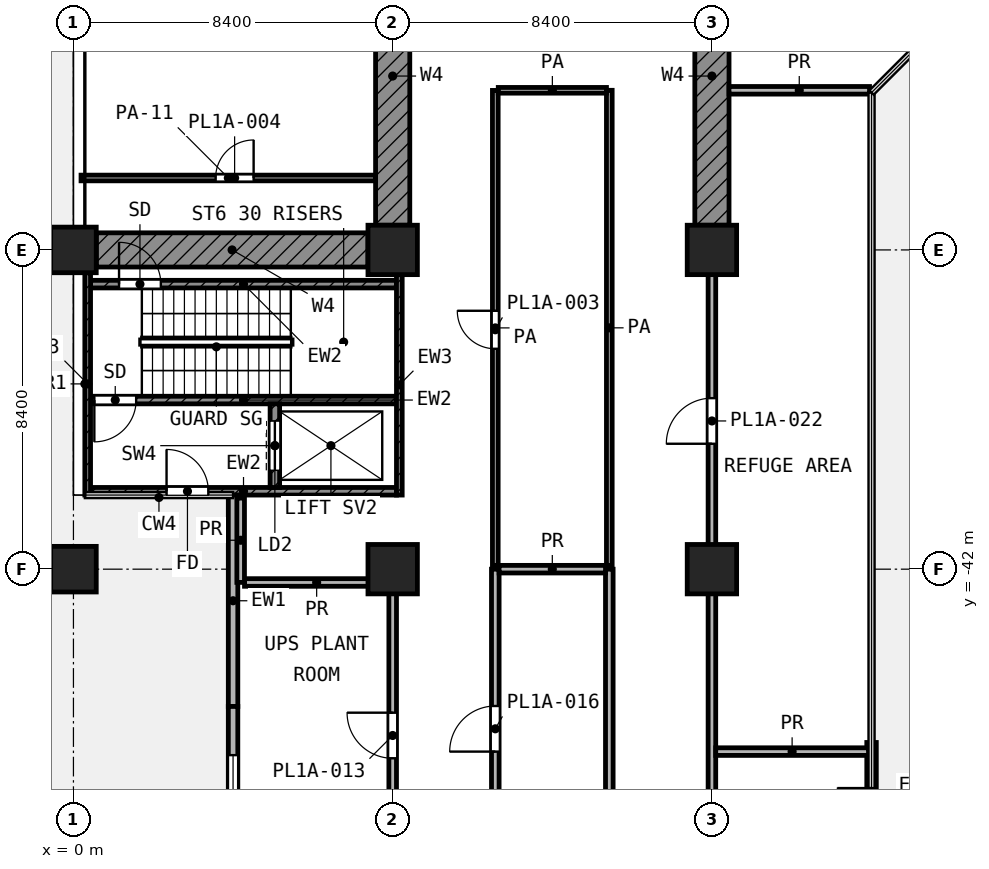
"""IFC4 building model, lengths in metres.
Left out: names, types, materials, properties, quantities, classifications, styles, units other than length and angle.
Written with IfcOpenShell. Run it as: python <this file> out.ifc"""

import sys

from ifc_helpers import new_model, si_unit, direction, frame, frame_2d, origin, origin_2d, place, context, subcontext, project, spatial, rectangle, extrude, element, fill, save


model = new_model("IFC4")
c1 = context("Model", 3, precision=1e-05, world=origin(), true_north=direction((0.0, 1.0)))
c2 = subcontext(c1, "Body", "Model", "MODEL_VIEW")
j1 = project(units=[si_unit("LENGTHUNIT", "METRE"), si_unit("PLANEANGLEUNIT", "RADIAN")], contexts=[c1])
p1 = place(None, origin())
s1 = spatial("IfcSite", under=j1, at=p1, CompositionType="ELEMENT")
p2 = place(p1, origin())
s2 = spatial("IfcBuilding", under=s1, at=p2, CompositionType="ELEMENT")
p3 = place(p2, frame((0.0, 0.0, 34.2)))
s3 = spatial("IfcBuildingStorey", under=s2, at=p3, CompositionType="ELEMENT", Elevation=34.2)
p4 = place(p3, frame((0.0, -33.6, 0.0), z_axis=(0.0, 0.0, 1.0), x_axis=(1.0, 0.0, 0.0)))
e1 = element("IfcColumn", 1, at=p4, inside=s3, PredefinedType="COLUMN", context=c2, shape_type="SweptSolid", body=[
    extrude(rectangle(XDim=1.2, YDim=1.2, at=origin_2d()), origin(), (0.0, 0.0, 1.0), 5.0),
])
for number, where, z_axis, x_axis in (
    (2, (8.4, -33.6, 0.0), (0.0, 0.0, 1.0), (1.0, 0.0, 0.0)),
    (3, (16.8, -33.6, 0.0), (0.0, 0.0, 1.0), (1.0, 0.0, 0.0)),
):
    element("IfcColumn", number, at=place(p3, frame(where, z_axis=z_axis, x_axis=x_axis)), inside=s3, PredefinedType="COLUMN", context=c2, shape_type="SweptSolid", body=[
        extrude(rectangle(XDim=1.3, YDim=1.3, at=origin_2d()), origin(), (0.0, 0.0, 1.0), 5.0),
    ])
p5 = place(p3, frame((0.0, -42.0, 0.0), z_axis=(0.0, 0.0, 1.0), x_axis=(1.0, 0.0, 0.0)))
e4 = element("IfcColumn", 4, at=p5, inside=s3, PredefinedType="COLUMN", context=c2, shape_type="SweptSolid", body=[
    extrude(rectangle(XDim=1.2, YDim=1.2, at=origin_2d()), origin(), (0.0, 0.0, 1.0), 5.0),
])
for number, where, z_axis, x_axis in (
    (5, (8.4, -42.0, 0.0), (0.0, 0.0, 1.0), (1.0, 0.0, 0.0)),
    (6, (16.8, -42.0, 0.0), (0.0, 0.0, 1.0), (1.0, 0.0, 0.0)),
):
    element("IfcColumn", number, at=place(p3, frame(where, z_axis=z_axis, x_axis=x_axis)), inside=s3, PredefinedType="COLUMN", context=c2, shape_type="SweptSolid", body=[
        extrude(rectangle(XDim=1.3, YDim=1.3, at=origin_2d()), origin(), (0.0, 0.0, 1.0), 5.0),
    ])
for number, where, z_axis, x_axis in (
    (7, (8.4, -25.1, 0.0), (0.0, 0.0, 1.0), (0.0, -1.0, 0.0)),
    (8, (16.8, -25.1, 0.0), (0.0, 0.0, 1.0), (0.0, -1.0, 0.0)),
):
    element("IfcWall", number, at=place(p3, frame(where, z_axis=z_axis, x_axis=x_axis)), inside=s3, PredefinedType="SHEAR", context=c2, shape_type="SweptSolid", body=[
        extrude(rectangle(XDim=7.85, YDim=0.9, at=frame_2d((3.925, 0.0))), origin(), (0.0, 0.0, 1.0), 4.58),
    ])
p6 = place(p3, frame((0.6, -33.6, 0.0), z_axis=(0.0, 0.0, 1.0), x_axis=(1.0, 0.0, 0.0)))
e9 = element("IfcWall", 9, at=p6, inside=s3, PredefinedType="SHEAR", context=c2, shape_type="SweptSolid", body=[
    extrude(rectangle(XDim=7.15, YDim=0.9, at=frame_2d((3.575, 0.0))), origin(), (0.0, 0.0, 1.0), 4.58),
])
p7 = place(p3, frame((4.2, -40.05, 0.0), z_axis=(0.0, 0.0, 1.0), x_axis=(0.0, -1.0, 0.0)))
e10 = element("IfcWall", 10, at=p7, inside=s3, PredefinedType="SOLIDWALL", context=c2, shape_type="SweptSolid", body=[
    extrude(rectangle(XDim=5.562, YDim=0.25, at=frame_2d((2.781, 0.0))), origin(), (0.0, 0.0, 1.0), 4.58),
])
p8 = place(p3, frame((4.2, -45.612, 0.0), z_axis=(0.0, 0.0, 1.0), x_axis=(0.0, -1.0, 0.0)))
e11 = element("IfcWall", 11, at=p8, inside=s3, PredefinedType="SOLIDWALL", context=c2, shape_type="SweptSolid", body=[
    extrude(rectangle(XDim=5.562, YDim=0.25, at=frame_2d((2.781, 0.0))), origin(), (0.0, 0.0, 1.0), 4.58),
])
p9 = place(p8, frame((1.281, 0.0, 0.6)))
e12 = element("IfcOpeningElement", 12, at=p9, cuts=e11, PredefinedType="OPENING", context=c2, shape_type="SweptSolid", body=[
    extrude(rectangle(XDim=3.0, YDim=2.4, at=frame_2d((1.5, 1.2))), frame((0.0, 0.135, 0.0), z_axis=(0.0, -1.0, 0.0), x_axis=(1.0, 0.0, 0.0)), (0.0, 0.0, 1.0), 0.27),
])
p10 = place(p3, frame((21.0, -50.76, 0.0), z_axis=(0.0, 0.0, 1.0), x_axis=(0.0, 1.0, 0.0)))
e13 = element("IfcWall", 13, at=p10, inside=s3, PredefinedType="SOLIDWALL", context=c2, shape_type="SweptSolid", body=[
    extrude(rectangle(XDim=4.2, YDim=0.25, at=frame_2d((2.1, 0.0))), origin(), (0.0, 0.0, 1.0), 4.42),
])
p11 = place(p10, frame((1.2, 0.0, 0.0)))
e14 = element("IfcOpeningElement", 14, at=p11, cuts=e13, PredefinedType="OPENING", context=c2, shape_type="SweptSolid", body=[
    extrude(rectangle(XDim=1.8, YDim=2.1, at=frame_2d((0.9, 1.05))), frame((0.0, 0.135, 0.0), z_axis=(0.0, -1.0, 0.0), x_axis=(1.0, 0.0, 0.0)), (0.0, 0.0, 1.0), 0.27),
])
p12 = place(p3, frame((0.375, -40.05, 0.0), z_axis=(0.0, 0.0, 1.0), x_axis=(0.0, 1.0, 0.0)))
e15 = element("IfcWall", 15, at=p12, inside=s3, PredefinedType="SHEAR", context=c2, shape_type="SweptSolid", body=[
    extrude(rectangle(XDim=5.85, YDim=0.15, at=frame_2d((2.925, 0.0))), origin(), (0.0, 0.0, 1.0), 4.58),
])
p13 = place(p3, frame((8.575, -40.05, 0.0), z_axis=(0.0, 0.0, 1.0), x_axis=(0.0, 1.0, 0.0)))
e16 = element("IfcWall", 16, at=p13, inside=s3, PredefinedType="SHEAR", context=c2, shape_type="SweptSolid", body=[
    extrude(rectangle(XDim=5.8, YDim=0.15, at=frame_2d((2.9, 0.0))), origin(), (0.0, 0.0, 1.0), 4.58),
])
p14 = place(p3, frame((0.45, -34.5, 0.0), z_axis=(0.0, 0.0, 1.0), x_axis=(1.0, 0.0, 0.0)))
e17 = element("IfcWall", 17, at=p14, inside=s3, PredefinedType="SHEAR", context=c2, shape_type="SweptSolid", body=[
    extrude(rectangle(XDim=8.05, YDim=0.2, at=frame_2d((4.025, 0.0))), origin(), (0.0, 0.0, 1.0), 4.58),
])
p15 = place(p14, frame((0.75, 0.0, 0.0)))
e18 = element("IfcOpeningElement", 18, at=p15, cuts=e17, PredefinedType="OPENING", context=c2, shape_type="SweptSolid", body=[
    extrude(rectangle(XDim=1.1, YDim=2.1, at=frame_2d((0.55, 1.05))), frame((0.0, 0.11, 0.0), z_axis=(0.0, -1.0, 0.0), x_axis=(1.0, 0.0, 0.0)), (0.0, 0.0, 1.0), 0.22),
])
p16 = place(p3, frame((0.45, -37.55, 0.0), z_axis=(0.0, 0.0, 1.0), x_axis=(1.0, 0.0, 0.0)))
e19 = element("IfcWall", 19, at=p16, inside=s3, PredefinedType="SHEAR", context=c2, shape_type="SweptSolid", body=[
    extrude(rectangle(XDim=8.05, YDim=0.2, at=frame_2d((4.025, 0.0))), origin(), (0.0, 0.0, 1.0), 4.58),
])
p17 = place(p16, frame((0.1, 0.0, 0.0)))
e20 = element("IfcOpeningElement", 20, at=p17, cuts=e19, PredefinedType="OPENING", context=c2, shape_type="SweptSolid", body=[
    extrude(rectangle(XDim=1.1, YDim=2.1, at=frame_2d((0.55, 1.05))), frame((0.0, 0.11, 0.0), z_axis=(0.0, -1.0, 0.0), x_axis=(1.0, 0.0, 0.0)), (0.0, 0.0, 1.0), 0.22),
])
p18 = place(p3, frame((0.45, -39.95, 0.0), z_axis=(0.0, 0.0, 1.0), x_axis=(1.0, 0.0, 0.0)))
e21 = element("IfcWall", 21, at=p18, inside=s3, PredefinedType="SHEAR", context=c2, shape_type="SweptSolid", body=[
    extrude(rectangle(XDim=8.05, YDim=0.2, at=frame_2d((4.025, 0.0))), origin(), (0.0, 0.0, 1.0), 4.58),
])
p19 = place(p18, frame((2.0, 0.0, 0.0)))
e22 = element("IfcOpeningElement", 22, at=p19, cuts=e21, PredefinedType="OPENING", context=c2, shape_type="SweptSolid", body=[
    extrude(rectangle(XDim=1.1, YDim=2.1, at=frame_2d((0.55, 1.05))), frame((0.0, 0.11, 0.0), z_axis=(0.0, -1.0, 0.0), x_axis=(1.0, 0.0, 0.0)), (0.0, 0.0, 1.0), 0.22),
])
p20 = place(p3, frame((5.3, -39.85, 0.0), z_axis=(0.0, 0.0, 1.0), x_axis=(0.0, 1.0, 0.0)))
e23 = element("IfcWall", 23, at=p20, inside=s3, PredefinedType="SHEAR", context=c2, shape_type="SweptSolid", body=[
    extrude(rectangle(XDim=2.2, YDim=0.25, at=frame_2d((1.1, 0.0))), origin(), (0.0, 0.0, 1.0), 4.58),
])
p21 = place(p20, frame((0.45, 0.0, 0.0)))
e24 = element("IfcOpeningElement", 24, at=p21, cuts=e23, PredefinedType="OPENING", context=c2, shape_type="SweptSolid", body=[
    extrude(rectangle(XDim=1.3, YDim=2.1, at=frame_2d((0.65, 1.05))), frame((0.0, 0.135, 0.0), z_axis=(0.0, -1.0, 0.0), x_axis=(1.0, 0.0, 0.0)), (0.0, 0.0, 1.0), 0.27),
])
p22 = place(p3, frame((0.2, -31.707, 0.0), z_axis=(0.0, 0.0, 1.0), x_axis=(1.0, 0.0, 0.0)))
e25 = element("IfcWall", 25, at=p22, inside=s3, PredefinedType="PARTITIONING", context=c2, shape_type="SweptSolid", body=[
    extrude(rectangle(XDim=7.751, YDim=0.15, at=frame_2d((3.875, 0.0))), origin(), (0.0, 0.0, 1.0), 3.08),
])
p23 = place(p22, frame((3.541, 0.0, 0.0)))
e26 = element("IfcOpeningElement", 26, at=p23, cuts=e25, PredefinedType="OPENING", context=c2, shape_type="SweptSolid", body=[
    extrude(rectangle(XDim=1.0, YDim=2.1, at=frame_2d((0.5, 1.05))), frame((0.0, 0.085, 0.0), z_axis=(0.0, -1.0, 0.0), x_axis=(1.0, 0.0, 0.0)), (0.0, 0.0, 1.0), 0.17),
])
p24 = place(p3, frame((11.178, -29.4, 0.0), z_axis=(0.0, 0.0, 1.0), x_axis=(1.0, 0.0, 0.0)))
e27 = element("IfcWall", 27, at=p24, inside=s3, PredefinedType="PARTITIONING", context=c2, shape_type="SweptSolid", body=[
    extrude(rectangle(XDim=2.847, YDim=0.15, at=frame_2d((1.423, 0.0))), origin(), (0.0, 0.0, 1.0), 4.58),
])
p25 = place(p3, frame((11.1, -41.9, 0.0), z_axis=(0.0, 0.0, 1.0), x_axis=(0.0, 1.0, 0.0)))
e28 = element("IfcWall", 28, at=p25, inside=s3, PredefinedType="PARTITIONING", context=c2, shape_type="SweptSolid", body=[
    extrude(rectangle(XDim=12.497, YDim=0.15, at=frame_2d((6.249, 0.0))), origin(), (0.0, 0.0, 1.0), 4.58),
])
p26 = place(p25, frame((5.699, 0.0, 0.0)))
e29 = element("IfcOpeningElement", 29, at=p26, cuts=e28, PredefinedType="OPENING", context=c2, shape_type="SweptSolid", body=[
    extrude(rectangle(XDim=1.0, YDim=2.1, at=frame_2d((0.5, 1.05))), frame((0.0, 0.085, 0.0), z_axis=(0.0, -1.0, 0.0), x_axis=(1.0, 0.0, 0.0)), (0.0, 0.0, 1.0), 0.17),
])
p27 = place(p3, frame((14.1, -41.9, 0.0), z_axis=(0.0, 0.0, 1.0), x_axis=(0.0, 1.0, 0.0)))
e30 = element("IfcWall", 30, at=p27, inside=s3, PredefinedType="PARTITIONING", context=c2, shape_type="SweptSolid", body=[
    extrude(rectangle(XDim=12.5, YDim=0.15, at=frame_2d((6.25, 0.0))), origin(), (0.0, 0.0, 1.0), 4.58),
])
p28 = place(p3, frame((16.9, -46.8, 0.0), z_axis=(0.0, 0.0, 1.0), x_axis=(1.0, 0.0, 0.0)))
e31 = element("IfcWall", 31, at=p28, inside=s3, PredefinedType="PARTITIONING", context=c2, shape_type="SweptSolid", body=[
    extrude(rectangle(XDim=4.02, YDim=0.2, at=frame_2d((2.01, 0.0))), origin(), (0.0, 0.0, 1.0), 4.58),
])
p29 = place(p3, frame((4.501, -42.35, 0.0), z_axis=(0.0, 0.0, 1.0), x_axis=(1.0, 0.0, 0.0)))
e32 = element("IfcWall", 32, at=p29, inside=s3, PredefinedType="PARTITIONING", context=c2, shape_type="SweptSolid", body=[
    extrude(rectangle(XDim=3.797, YDim=0.2, at=frame_2d((1.898, 0.0))), origin(), (0.0, 0.0, 1.0), 4.58),
])
p30 = place(p3, frame((11.2, -42.0, 0.0), z_axis=(0.0, 0.0, 1.0), x_axis=(1.0, 0.0, 0.0)))
e33 = element("IfcWall", 33, at=p30, inside=s3, PredefinedType="PARTITIONING", context=c2, shape_type="SweptSolid", body=[
    extrude(rectangle(XDim=2.8, YDim=0.2, at=frame_2d((1.4, 0.0))), origin(), (0.0, 0.0, 1.0), 4.58),
])
p31 = place(p3, frame((17.249, -29.4, 0.0), z_axis=(0.0, 0.0, 1.0), x_axis=(1.0, 0.0, 0.0)))
e34 = element("IfcWall", 34, at=p31, inside=s3, PredefinedType="PARTITIONING", context=c2, shape_type="SweptSolid", body=[
    extrude(rectangle(XDim=3.698, YDim=0.2, at=frame_2d((1.849, 0.0))), origin(), (0.0, 0.0, 1.0), 4.58),
])
p32 = place(p3, frame((4.4, -42.348, 0.0), z_axis=(0.0, 0.0, 1.0), x_axis=(0.0, 1.0, 0.0)))
e35 = element("IfcWall", 35, at=p32, inside=s3, PredefinedType="PARTITIONING", context=c2, shape_type="SweptSolid", body=[
    extrude(rectangle(XDim=2.218, YDim=0.2, at=frame_2d((1.109, 0.0))), origin(), (0.0, 0.0, 1.0), 4.58),
])
p33 = place(p3, frame((8.4, -71.321, 0.0), z_axis=(0.0, 0.0, 1.0), x_axis=(0.0, 1.0, 0.0)))
e36 = element("IfcWall", 36, at=p33, inside=s3, PredefinedType="PARTITIONING", context=c2, shape_type="SweptSolid", body=[
    extrude(rectangle(XDim=28.969, YDim=0.2, at=frame_2d((14.484, 0.0))), origin(), (0.0, 0.0, 1.0), 4.58),
])
p34 = place(p33, frame((24.345, 0.0, 0.0)))
e37 = element("IfcOpeningElement", 37, at=p34, cuts=e36, PredefinedType="OPENING", context=c2, shape_type="SweptSolid", body=[
    extrude(rectangle(XDim=1.2, YDim=2.1, at=frame_2d((0.6, 1.05))), frame((0.0, 0.11, 0.0), z_axis=(0.0, -1.0, 0.0), x_axis=(1.0, 0.0, 0.0)), (0.0, 0.0, 1.0), 0.22),
])
p35 = place(p33, frame((16.121, 0.0, 0.0)))
e38 = element("IfcOpeningElement", 38, at=p35, cuts=e36, PredefinedType="OPENING", context=c2, shape_type="SweptSolid", body=[
    extrude(rectangle(XDim=1.2, YDim=2.1, at=frame_2d((0.6, 1.05))), frame((0.0, 0.11, 0.0), z_axis=(0.0, -1.0, 0.0), x_axis=(1.0, 0.0, 0.0)), (0.0, 0.0, 1.0), 0.22),
])
p36 = place(p33, frame((5.621, 0.0, 0.0)))
e39 = element("IfcOpeningElement", 39, at=p36, cuts=e36, PredefinedType="OPENING", context=c2, shape_type="SweptSolid", body=[
    extrude(rectangle(XDim=1.2, YDim=2.1, at=frame_2d((0.6, 1.05))), frame((0.0, 0.11, 0.0), z_axis=(0.0, -1.0, 0.0), x_axis=(1.0, 0.0, 0.0)), (0.0, 0.0, 1.0), 0.22),
])
p37 = place(p3, frame((11.1, -68.697, 0.0), z_axis=(0.0, 0.0, 1.0), x_axis=(0.0, 1.0, 0.0)))
e40 = element("IfcWall", 40, at=p37, inside=s3, PredefinedType="PARTITIONING", context=c2, shape_type="SweptSolid", body=[
    extrude(rectangle(XDim=26.697, YDim=0.2, at=frame_2d((13.349, 0.0))), origin(), (0.0, 0.0, 1.0), 4.58),
])
p38 = place(p37, frame((21.897, 0.0, 0.0)))
e41 = element("IfcOpeningElement", 41, at=p38, cuts=e40, PredefinedType="OPENING", context=c2, shape_type="SweptSolid", body=[
    extrude(rectangle(XDim=1.2, YDim=2.1, at=frame_2d((0.6, 1.05))), frame((0.0, 0.11, 0.0), z_axis=(0.0, -1.0, 0.0), x_axis=(1.0, 0.0, 0.0)), (0.0, 0.0, 1.0), 0.22),
])
p39 = place(p37, frame((13.497, 0.0, 0.0)))
e42 = element("IfcOpeningElement", 42, at=p39, cuts=e40, PredefinedType="OPENING", context=c2, shape_type="SweptSolid", body=[
    extrude(rectangle(XDim=1.2, YDim=2.1, at=frame_2d((0.6, 1.05))), frame((0.0, 0.11, 0.0), z_axis=(0.0, -1.0, 0.0), x_axis=(1.0, 0.0, 0.0)), (0.0, 0.0, 1.0), 0.22),
])
p40 = place(p37, frame((4.349, 0.0, 0.0)))
e43 = element("IfcOpeningElement", 43, at=p40, cuts=e40, PredefinedType="OPENING", context=c2, shape_type="SweptSolid", body=[
    extrude(rectangle(XDim=1.2, YDim=2.1, at=frame_2d((0.6, 1.05))), frame((0.0, 0.11, 0.0), z_axis=(0.0, -1.0, 0.0), x_axis=(1.0, 0.0, 0.0)), (0.0, 0.0, 1.0), 0.22),
])
p41 = place(p3, frame((14.1, -68.7, 0.0), z_axis=(0.0, 0.0, 1.0), x_axis=(0.0, 1.0, 0.0)))
e44 = element("IfcWall", 44, at=p41, inside=s3, PredefinedType="PARTITIONING", context=c2, shape_type="SweptSolid", body=[
    extrude(rectangle(XDim=26.7, YDim=0.2, at=frame_2d((13.35, 0.0))), origin(), (0.0, 0.0, 1.0), 4.58),
])
p42 = place(p3, frame((16.8, -71.321, 0.0), z_axis=(0.0, 0.0, 1.0), x_axis=(0.0, 1.0, 0.0)))
e45 = element("IfcWall", 45, at=p42, inside=s3, PredefinedType="PARTITIONING", context=c2, shape_type="SweptSolid", body=[
    extrude(rectangle(XDim=38.371, YDim=0.2, at=frame_2d((19.186, 0.0))), origin(), (0.0, 0.0, 1.0), 4.58),
])
p43 = place(p42, frame((32.621, 0.0, 0.0)))
e46 = element("IfcOpeningElement", 46, at=p43, cuts=e45, PredefinedType="OPENING", context=c2, shape_type="SweptSolid", body=[
    extrude(rectangle(XDim=1.2, YDim=2.1, at=frame_2d((0.6, 1.05))), frame((0.0, 0.11, 0.0), z_axis=(0.0, -1.0, 0.0), x_axis=(1.0, 0.0, 0.0)), (0.0, 0.0, 1.0), 0.22),
])
p44 = place(p42, frame((15.671, 0.0, 0.0)))
e47 = element("IfcOpeningElement", 47, at=p44, cuts=e45, PredefinedType="OPENING", context=c2, shape_type="SweptSolid", body=[
    extrude(rectangle(XDim=1.2, YDim=2.1, at=frame_2d((0.6, 1.05))), frame((0.0, 0.11, 0.0), z_axis=(0.0, -1.0, 0.0), x_axis=(1.0, 0.0, 0.0)), (0.0, 0.0, 1.0), 0.22),
])
p45 = place(p42, frame((2.17, 0.0, 0.0)))
e48 = element("IfcOpeningElement", 48, at=p45, cuts=e45, PredefinedType="OPENING", context=c2, shape_type="SweptSolid", body=[
    extrude(rectangle(XDim=1.2, YDim=2.1, at=frame_2d((0.6, 1.05))), frame((0.0, 0.11, 0.0), z_axis=(0.0, -1.0, 0.0), x_axis=(1.0, 0.0, 0.0)), (0.0, 0.0, 1.0), 0.22),
])
p46 = place(p9, origin())
e49 = element("IfcWindow", 49, at=p46, inside=s3, PartitioningType="SINGLE_PANEL", PredefinedType="WINDOW", context=c2, shape_type="SweptSolid", body=[
    extrude(rectangle(XDim=3.0, YDim=2.4, at=frame_2d((1.5, 1.2))), frame((0.0, 0.03, 0.0), z_axis=(0.0, -1.0, 0.0), x_axis=(1.0, 0.0, 0.0)), (0.0, 0.0, 1.0), 0.06),
])
fill(e12, e49)
p47 = place(p11, origin())
e50 = element("IfcDoor", 50, at=p47, inside=s3, OperationType="DOUBLE_DOOR_SINGLE_SWING", PredefinedType="DOOR", context=c2, shape_type="SweptSolid", body=[
    extrude(rectangle(XDim=1.8, YDim=2.1, at=frame_2d((0.9, 1.05))), frame((0.0, 0.025, 0.0), z_axis=(0.0, -1.0, 0.0), x_axis=(1.0, 0.0, 0.0)), (0.0, 0.0, 1.0), 0.05),
])
fill(e14, e50)
p48 = place(p15, origin())
e51 = element("IfcDoor", 51, at=p48, inside=s3, OperationType="SINGLE_SWING_LEFT", PredefinedType="DOOR", context=c2, shape_type="SweptSolid", body=[
    extrude(rectangle(XDim=1.1, YDim=2.1, at=frame_2d((0.55, 1.05))), frame((0.0, 0.025, 0.0), z_axis=(0.0, -1.0, 0.0), x_axis=(1.0, 0.0, 0.0)), (0.0, 0.0, 1.0), 0.05),
])
fill(e18, e51)
p49 = place(p17, frame((1.1, 0.0, 0.0), z_axis=(0.0, 0.0, 1.0), x_axis=(-1.0, 0.0, 0.0)))
e52 = element("IfcDoor", 52, at=p49, inside=s3, OperationType="SINGLE_SWING_LEFT", PredefinedType="DOOR", context=c2, shape_type="SweptSolid", body=[
    extrude(rectangle(XDim=1.1, YDim=2.1, at=frame_2d((0.55, 1.05))), frame((0.0, 0.025, 0.0), z_axis=(0.0, -1.0, 0.0), x_axis=(1.0, 0.0, 0.0)), (0.0, 0.0, 1.0), 0.05),
])
fill(e20, e52)
p50 = place(p21, origin())
e53 = element("IfcDoor", 53, at=p50, inside=s3, OperationType="DOUBLE_DOOR_SLIDING", PredefinedType="DOOR", context=c2, shape_type="SweptSolid", body=[
    extrude(rectangle(XDim=1.3, YDim=2.1, at=frame_2d((0.65, 1.05))), frame((0.0, 0.025, 0.0), z_axis=(0.0, -1.0, 0.0), x_axis=(1.0, 0.0, 0.0)), (0.0, 0.0, 1.0), 0.05),
])
fill(e24, e53)
p51 = place(p19, origin())
e54 = element("IfcDoor", 54, at=p51, inside=s3, OperationType="SINGLE_SWING_LEFT", PredefinedType="DOOR", context=c2, shape_type="SweptSolid", body=[
    extrude(rectangle(XDim=1.1, YDim=2.1, at=frame_2d((0.55, 1.05))), frame((0.0, 0.025, 0.0), z_axis=(0.0, -1.0, 0.0), x_axis=(1.0, 0.0, 0.0)), (0.0, 0.0, 1.0), 0.05),
])
fill(e22, e54)
p52 = place(p34, origin())
e55 = element("IfcDoor", 55, at=p52, inside=s3, OperationType="SINGLE_SWING_RIGHT", PredefinedType="DOOR", context=c2, shape_type="SweptSolid", body=[
    extrude(rectangle(XDim=1.2, YDim=2.1, at=frame_2d((0.6, 1.05))), frame((0.0, 0.025, 0.0), z_axis=(0.0, -1.0, 0.0), x_axis=(1.0, 0.0, 0.0)), (0.0, 0.0, 1.0), 0.05),
])
fill(e37, e55)
p53 = place(p26, origin())
e56 = element("IfcDoor", 56, at=p53, inside=s3, OperationType="SINGLE_SWING_RIGHT", PredefinedType="DOOR", context=c2, shape_type="SweptSolid", body=[
    extrude(rectangle(XDim=1.0, YDim=2.1, at=frame_2d((0.5, 1.05))), frame((0.0, 0.025, 0.0), z_axis=(0.0, -1.0, 0.0), x_axis=(1.0, 0.0, 0.0)), (0.0, 0.0, 1.0), 0.05),
])
fill(e29, e56)
p54 = place(p38, origin())
e57 = element("IfcDoor", 57, at=p54, inside=s3, OperationType="SINGLE_SWING_LEFT", PredefinedType="DOOR", context=c2, shape_type="SweptSolid", body=[
    extrude(rectangle(XDim=1.2, YDim=2.1, at=frame_2d((0.6, 1.05))), frame((0.0, 0.025, 0.0), z_axis=(0.0, -1.0, 0.0), x_axis=(1.0, 0.0, 0.0)), (0.0, 0.0, 1.0), 0.05),
])
fill(e41, e57)
p55 = place(p43, origin())
e58 = element("IfcDoor", 58, at=p55, inside=s3, OperationType="SINGLE_SWING_LEFT", PredefinedType="DOOR", context=c2, shape_type="SweptSolid", body=[
    extrude(rectangle(XDim=1.2, YDim=2.1, at=frame_2d((0.6, 1.05))), frame((0.0, 0.025, 0.0), z_axis=(0.0, -1.0, 0.0), x_axis=(1.0, 0.0, 0.0)), (0.0, 0.0, 1.0), 0.05),
])
fill(e46, e58)
p56 = place(p23, origin())
e59 = element("IfcDoor", 59, at=p56, inside=s3, OperationType="SINGLE_SWING_RIGHT", PredefinedType="DOOR", context=c2, shape_type="SweptSolid", body=[
    extrude(rectangle(XDim=1.0, YDim=2.1, at=frame_2d((0.5, 1.05))), frame((0.0, 0.025, 0.0), z_axis=(0.0, -1.0, 0.0), x_axis=(1.0, 0.0, 0.0)), (0.0, 0.0, 1.0), 0.05),
])
fill(e26, e59)
save(model, sys.argv[1])
